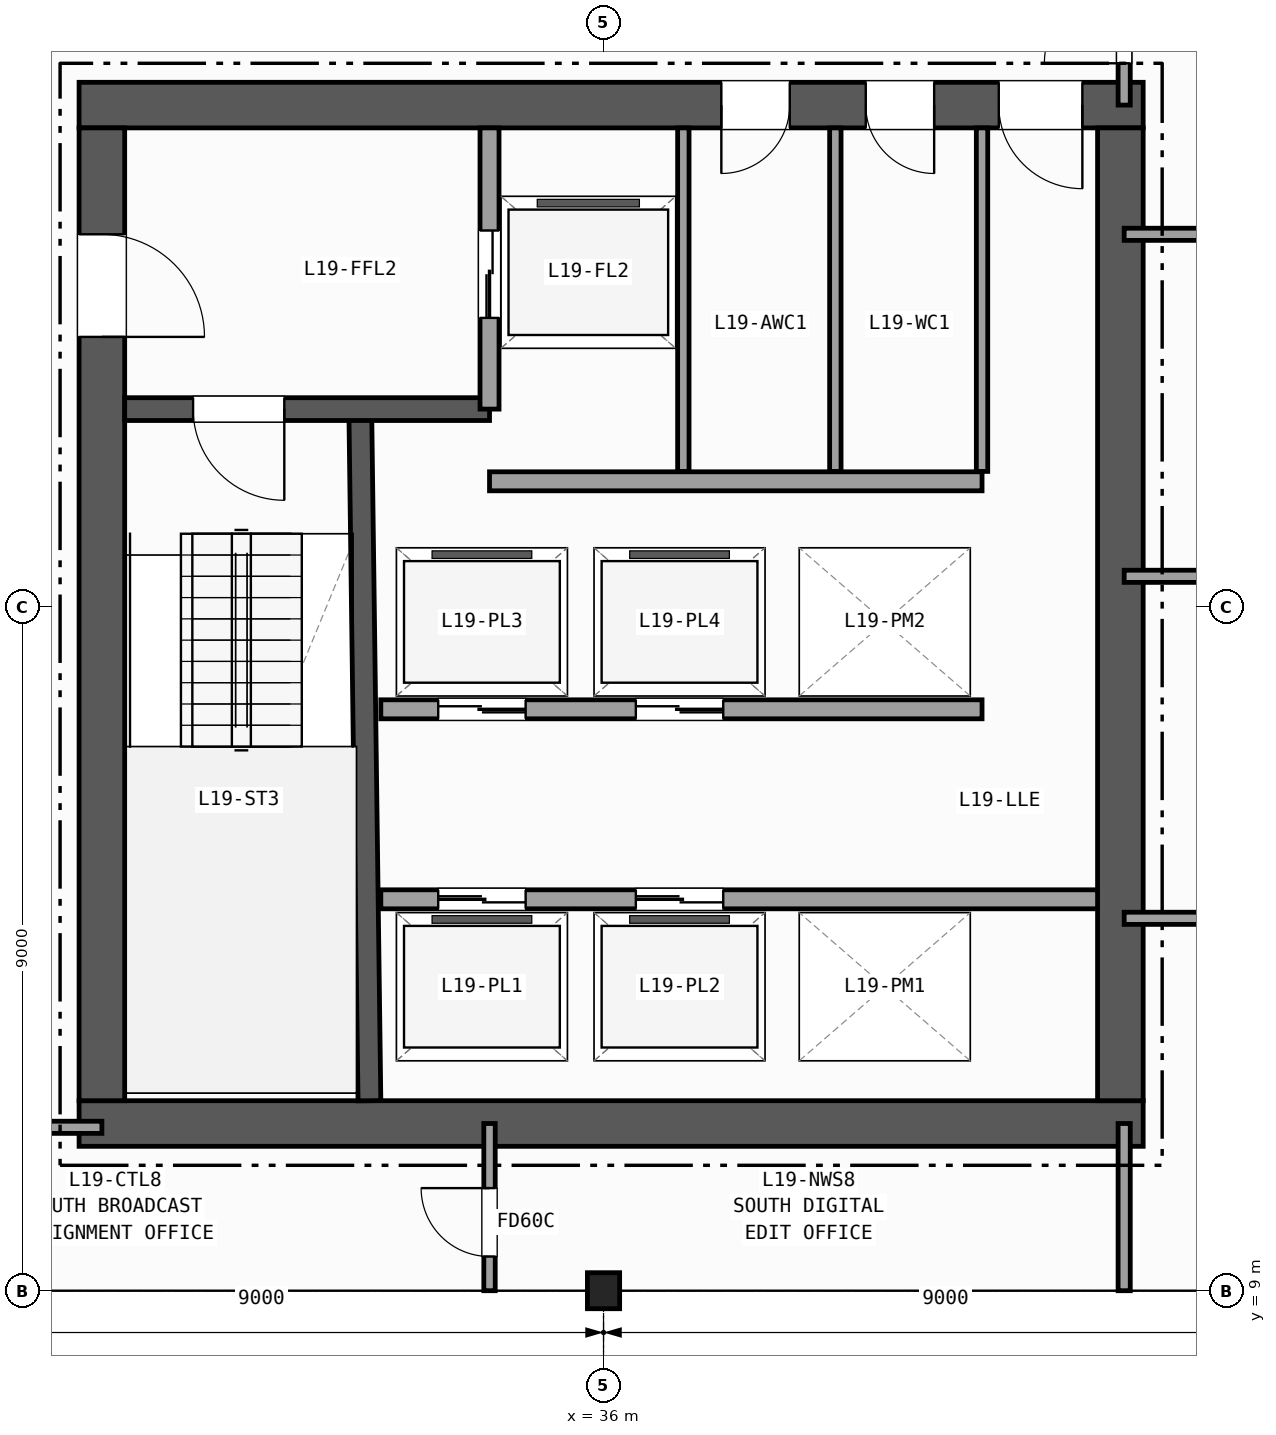
"""IFC4 building model, lengths in metres.
Left out: names, types, materials, properties, quantities, classifications, styles, units other than length and angle.
Written with IfcOpenShell. Run it as: python <this file> out.ifc"""

import sys

from ifc_helpers import new_model, si_unit, direction, frame, frame_2d, origin, origin_2d, place, context, subcontext, project, spatial, rectangle, i_section, extrude, element, fill, save


model = new_model("IFC4")
c1 = context("Model", 3, precision=1e-05, world=origin(), true_north=direction((0.0, 1.0)))
c2 = subcontext(c1, "Body", "Model", "MODEL_VIEW")
j1 = project(units=[si_unit("LENGTHUNIT", "METRE"), si_unit("PLANEANGLEUNIT", "RADIAN")], contexts=[c1])
p1 = place(None, origin())
s1 = spatial("IfcSite", under=j1, at=p1, CompositionType="ELEMENT")
p2 = place(p1, origin())
s2 = spatial("IfcBuilding", under=s1, at=p2, CompositionType="ELEMENT")
p3 = place(p2, frame((0.0, 0.0, 80.4)))
s3 = spatial("IfcBuildingStorey", under=s2, at=p3, CompositionType="ELEMENT", Elevation=80.4)
p4 = place(p3, frame((36.0, 9.0, 0.0), z_axis=(0.0, 0.0, 1.0), x_axis=(1.0, 0.0, 0.0)))
e1 = element("IfcColumn", 1, at=p4, inside=s3, PredefinedType="COLUMN", context=c2, shape_type="SweptSolid", body=[
    extrude(i_section(OverallWidth=0.424, OverallDepth=0.474, WebThickness=0.048, FlangeThickness=0.077, FilletRadius=0.015, at=origin_2d()), origin(), (0.0, 0.0, 1.0), 3.7),
])
p5 = place(p3, frame((29.1, 11.2, 0.0), z_axis=(0.0, 0.0, 1.0), x_axis=(1.0, 0.0, 0.0)))
e2 = element("IfcWall", 2, at=p5, inside=s3, PredefinedType="SHEAR", context=c2, shape_type="SweptSolid", body=[
    extrude(rectangle(XDim=14.0, YDim=0.6, at=frame_2d((7.0, 0.0))), origin(), (0.0, 0.0, 1.0), 3.37),
])
p6 = place(p3, frame((43.1, 24.6, 0.0), z_axis=(0.0, 0.0, 1.0), x_axis=(-1.0, 0.0, 0.0)))
e3 = element("IfcWall", 3, at=p6, inside=s3, PredefinedType="SHEAR", context=c2, shape_type="SweptSolid", body=[
    extrude(rectangle(XDim=14.0, YDim=0.6, at=frame_2d((7.0, 0.0))), origin(), (0.0, 0.0, 1.0), 3.37),
])
p7 = place(p6, frame((0.8, 0.0, 0.0)))
e4 = element("IfcOpeningElement", 4, at=p7, cuts=e3, PredefinedType="OPENING", context=c2, shape_type="SweptSolid", body=[
    extrude(rectangle(XDim=1.1, YDim=2.15, at=frame_2d((0.55, 1.075))), frame((0.0, 0.31, 0.0), z_axis=(0.0, -1.0, 0.0), x_axis=(1.0, 0.0, 0.0)), (0.0, 0.0, 1.0), 0.62),
])
p8 = place(p6, frame((2.75, 0.0, 0.0)))
e5 = element("IfcOpeningElement", 5, at=p8, cuts=e3, PredefinedType="OPENING", context=c2, shape_type="SweptSolid", body=[
    extrude(rectangle(XDim=0.9, YDim=2.1, at=frame_2d((0.45, 1.05))), frame((0.0, 0.31, 0.0), z_axis=(0.0, -1.0, 0.0), x_axis=(1.0, 0.0, 0.0)), (0.0, 0.0, 1.0), 0.62),
])
p9 = place(p6, frame((4.65, 0.0, 0.0)))
e6 = element("IfcOpeningElement", 6, at=p9, cuts=e3, PredefinedType="OPENING", context=c2, shape_type="SweptSolid", body=[
    extrude(rectangle(XDim=0.9, YDim=2.1, at=frame_2d((0.45, 1.05))), frame((0.0, 0.31, 0.0), z_axis=(0.0, -1.0, 0.0), x_axis=(1.0, 0.0, 0.0)), (0.0, 0.0, 1.0), 0.62),
])
p10 = place(p3, frame((29.4, 24.3, 0.0), z_axis=(0.0, 0.0, 1.0), x_axis=(0.0, -1.0, 0.0)))
e7 = element("IfcWall", 7, at=p10, inside=s3, PredefinedType="SHEAR", context=c2, shape_type="SweptSolid", body=[
    extrude(rectangle(XDim=12.8, YDim=0.6, at=frame_2d((6.4, 0.0))), origin(), (0.0, 0.0, 1.0), 3.37),
])
p11 = place(p10, frame((1.4, 0.0, 0.0)))
e8 = element("IfcOpeningElement", 8, at=p11, cuts=e7, PredefinedType="OPENING", context=c2, shape_type="SweptSolid", body=[
    extrude(rectangle(XDim=1.35, YDim=2.15, at=frame_2d((0.675, 1.075))), frame((0.0, 0.31, 0.0), z_axis=(0.0, -1.0, 0.0), x_axis=(1.0, 0.0, 0.0)), (0.0, 0.0, 1.0), 0.62),
])
p12 = place(p3, frame((42.8, 11.5, 0.0), z_axis=(0.0, 0.0, 1.0), x_axis=(0.0, 1.0, 0.0)))
e9 = element("IfcWall", 9, at=p12, inside=s3, PredefinedType="SHEAR", context=c2, shape_type="SweptSolid", body=[
    extrude(rectangle(XDim=12.8, YDim=0.6, at=frame_2d((6.4, 0.0))), origin(), (0.0, 0.0, 1.0), 3.37),
])
p13 = place(p3, frame((32.92, 11.5, 0.0), z_axis=(0.0, 0.0, 1.0), x_axis=(-0.013244407292, 0.999912288991, 0.0)))
e10 = element("IfcWall", 10, at=p13, inside=s3, PredefinedType="SHEAR", context=c2, shape_type="SweptSolid", body=[
    extrude(rectangle(XDim=9.051, YDim=0.3, at=frame_2d((4.525, 0.0))), origin(), (0.0, 0.0, 1.0), 3.37),
])
p14 = place(p3, frame((34.5, 20.6, 0.0), z_axis=(0.0, 0.0, 1.0), x_axis=(-1.0, 0.0, 0.0)))
e11 = element("IfcWall", 11, at=p14, inside=s3, PredefinedType="SHEAR", context=c2, shape_type="SweptSolid", body=[
    extrude(rectangle(XDim=4.8, YDim=0.3, at=frame_2d((2.4, 0.0))), origin(), (0.0, 0.0, 1.0), 3.37),
])
p15 = place(p14, frame((2.7, 0.0, 0.0)))
e12 = element("IfcOpeningElement", 12, at=p15, cuts=e11, PredefinedType="OPENING", context=c2, shape_type="SweptSolid", body=[
    extrude(rectangle(XDim=1.2, YDim=2.15, at=frame_2d((0.6, 1.075))), frame((0.0, 0.16, 0.0), z_axis=(0.0, -1.0, 0.0), x_axis=(1.0, 0.0, 0.0)), (0.0, 0.0, 1.0), 0.32),
])
p16 = place(p3, frame((34.5, 20.6, 0.0), z_axis=(0.0, 0.0, 1.0), x_axis=(0.0, 1.0, 0.0)))
e13 = element("IfcWall", 13, at=p16, inside=s3, PredefinedType="PARTITIONING", context=c2, shape_type="SweptSolid", body=[
    extrude(rectangle(XDim=3.7, YDim=0.25, at=frame_2d((1.85, 0.0))), origin(), (0.0, 0.0, 1.0), 3.37),
])
p17 = place(p16, frame((1.2, 0.0, 0.0)))
e14 = element("IfcOpeningElement", 14, at=p17, cuts=e13, PredefinedType="OPENING", context=c2, shape_type="SweptSolid", body=[
    extrude(rectangle(XDim=1.15, YDim=2.15, at=frame_2d((0.575, 1.075))), frame((0.0, 0.135, 0.0), z_axis=(0.0, -1.0, 0.0), x_axis=(1.0, 0.0, 0.0)), (0.0, 0.0, 1.0), 0.27),
])
p18 = place(p3, frame((34.5, 19.65, 0.0), z_axis=(0.0, 0.0, 1.0), x_axis=(1.0, 0.0, 0.0)))
e15 = element("IfcWall", 15, at=p18, inside=s3, PredefinedType="PARTITIONING", context=c2, shape_type="SweptSolid", body=[
    extrude(rectangle(XDim=6.48, YDim=0.25, at=frame_2d((3.24, 0.0))), origin(), (0.0, 0.0, 1.0), 3.37),
])
p19 = place(p3, frame((33.07, 14.15, 0.0), z_axis=(0.0, 0.0, 1.0), x_axis=(1.0, 0.0, 0.0)))
e16 = element("IfcWall", 16, at=p19, inside=s3, PredefinedType="PARTITIONING", context=c2, shape_type="SweptSolid", body=[
    extrude(rectangle(XDim=9.43, YDim=0.25, at=frame_2d((4.715, 0.0))), origin(), (0.0, 0.0, 1.0), 3.37),
])
p20 = place(p19, frame((0.755, 0.0, 0.0)))
e17 = element("IfcOpeningElement", 17, at=p20, cuts=e16, PredefinedType="OPENING", context=c2, shape_type="SweptSolid", body=[
    extrude(rectangle(XDim=1.15, YDim=2.15, at=frame_2d((0.575, 1.075))), frame((0.0, 0.135, 0.0), z_axis=(0.0, -1.0, 0.0), x_axis=(1.0, 0.0, 0.0)), (0.0, 0.0, 1.0), 0.27),
])
p21 = place(p19, frame((3.355, 0.0, 0.0)))
e18 = element("IfcOpeningElement", 18, at=p21, cuts=e16, PredefinedType="OPENING", context=c2, shape_type="SweptSolid", body=[
    extrude(rectangle(XDim=1.15, YDim=2.15, at=frame_2d((0.575, 1.075))), frame((0.0, 0.135, 0.0), z_axis=(0.0, -1.0, 0.0), x_axis=(1.0, 0.0, 0.0)), (0.0, 0.0, 1.0), 0.27),
])
p22 = place(p3, frame((40.98, 16.65, 0.0), z_axis=(0.0, 0.0, 1.0), x_axis=(-1.0, 0.0, 0.0)))
e19 = element("IfcWall", 19, at=p22, inside=s3, PredefinedType="PARTITIONING", context=c2, shape_type="SweptSolid", body=[
    extrude(rectangle(XDim=7.91, YDim=0.25, at=frame_2d((3.955, 0.0))), origin(), (0.0, 0.0, 1.0), 3.37),
])
p23 = place(p22, frame((6.005, 0.0, 0.0)))
e20 = element("IfcOpeningElement", 20, at=p23, cuts=e19, PredefinedType="OPENING", context=c2, shape_type="SweptSolid", body=[
    extrude(rectangle(XDim=1.15, YDim=2.15, at=frame_2d((0.575, 1.075))), frame((0.0, 0.135, 0.0), z_axis=(0.0, -1.0, 0.0), x_axis=(1.0, 0.0, 0.0)), (0.0, 0.0, 1.0), 0.27),
])
p24 = place(p22, frame((3.405, 0.0, 0.0)))
e21 = element("IfcOpeningElement", 21, at=p24, cuts=e19, PredefinedType="OPENING", context=c2, shape_type="SweptSolid", body=[
    extrude(rectangle(XDim=1.15, YDim=2.15, at=frame_2d((0.575, 1.075))), frame((0.0, 0.135, 0.0), z_axis=(0.0, -1.0, 0.0), x_axis=(1.0, 0.0, 0.0)), (0.0, 0.0, 1.0), 0.27),
])
for number, where, z_axis, x_axis in (
    (22, (37.05, 19.78, 0.0), (0.0, 0.0, 1.0), (0.0, 1.0, 0.0)),
    (23, (39.05, 19.78, 0.0), (0.0, 0.0, 1.0), (0.0, 1.0, 0.0)),
    (24, (40.98, 19.78, 0.0), (0.0, 0.0, 1.0), (0.0, 1.0, 0.0)),
):
    element("IfcWall", number, at=place(p3, frame(where, z_axis=z_axis, x_axis=x_axis)), inside=s3, PredefinedType="PARTITIONING", context=c2, shape_type="SweptSolid", body=[
        extrude(rectangle(XDim=4.52, YDim=0.15, at=frame_2d((2.26, 0.0))), origin(), (0.0, 0.0, 1.0), 3.37),
    ])
p25 = place(p3, frame((24.65, 11.15, 0.0), z_axis=(0.0, 0.0, 1.0), x_axis=(1.0, 0.0, 0.0)))
e25 = element("IfcWall", 25, at=p25, inside=s3, PredefinedType="PARTITIONING", context=c2, shape_type="SweptSolid", body=[
    extrude(rectangle(XDim=4.75, YDim=0.16, at=frame_2d((2.375, 0.0))), origin(), (0.0, 0.0, 1.0), 2.742),
])
p26 = place(p25, frame((1.2, 0.0, 0.0)))
e26 = element("IfcOpeningElement", 26, at=p26, cuts=e25, PredefinedType="OPENING", context=c2, shape_type="SweptSolid", body=[
    extrude(rectangle(XDim=0.95, YDim=2.1, at=frame_2d((0.475, 1.05))), frame((0.0, 0.09, 0.0), z_axis=(0.0, -1.0, 0.0), x_axis=(1.0, 0.0, 0.0)), (0.0, 0.0, 1.0), 0.18),
])
p27 = place(p3, frame((34.5, 9.0, 0.0), z_axis=(0.0, 0.0, 1.0), x_axis=(0.0, 1.0, 0.0)))
e27 = element("IfcWall", 27, at=p27, inside=s3, PredefinedType="PARTITIONING", context=c2, shape_type="SweptSolid", body=[
    extrude(rectangle(XDim=2.2, YDim=0.15, at=frame_2d((1.1, 0.0))), origin(), (0.0, 0.0, 1.0), 2.577),
])
p28 = place(p27, frame((0.45, 0.0, 0.0)))
e28 = element("IfcOpeningElement", 28, at=p28, cuts=e27, PredefinedType="OPENING", context=c2, shape_type="SweptSolid", body=[
    extrude(rectangle(XDim=0.9, YDim=2.1, at=frame_2d((0.45, 1.05))), frame((0.0, 0.085, 0.0), z_axis=(0.0, -1.0, 0.0), x_axis=(1.0, 0.0, 0.0)), (0.0, 0.0, 1.0), 0.17),
])
p29 = place(p3, frame((42.85, 9.0, 0.0), z_axis=(0.0, 0.0, 1.0), x_axis=(0.0, 1.0, 0.0)))
e29 = element("IfcWall", 29, at=p29, inside=s3, PredefinedType="PARTITIONING", context=c2, shape_type="SweptSolid", body=[
    extrude(rectangle(XDim=2.2, YDim=0.16, at=frame_2d((1.1, 0.0))), origin(), (0.0, 0.0, 1.0), 2.577),
])
p30 = place(p3, frame((42.85, 24.6, 0.0), z_axis=(0.0, 0.0, 1.0), x_axis=(0.0, 1.0, 0.0)))
e30 = element("IfcWall", 30, at=p30, inside=s3, PredefinedType="PARTITIONING", context=c2, shape_type="SweptSolid", body=[
    extrude(rectangle(XDim=2.4, YDim=0.16, at=frame_2d((1.2, 0.0))), origin(), (0.0, 0.0, 1.0), 2.577),
])
p31 = place(p30, frame((0.55, 0.0, 0.0)))
e31 = element("IfcOpeningElement", 31, at=p31, cuts=e30, PredefinedType="OPENING", context=c2, shape_type="SweptSolid", body=[
    extrude(rectangle(XDim=1.05, YDim=2.15, at=frame_2d((0.525, 1.075))), frame((0.0, 0.09, 0.0), z_axis=(0.0, -1.0, 0.0), x_axis=(1.0, 0.0, 0.0)), (0.0, 0.0, 1.0), 0.18),
])
p32 = place(p3, frame((42.85, 13.9, 0.0), z_axis=(0.0, 0.0, 1.0), x_axis=(1.0, 0.0, 0.0)))
e32 = element("IfcWall", 32, at=p32, inside=s3, PredefinedType="PARTITIONING", context=c2, shape_type="SweptSolid", body=[
    extrude(rectangle(XDim=20.428, YDim=0.16, at=frame_2d((10.214, 0.0))), origin(), (0.0, 0.0, 1.0), 2.742),
])
p33 = place(p32, frame((4.6, 0.0, 0.0)))
e33 = element("IfcOpeningElement", 33, at=p33, cuts=e32, PredefinedType="OPENING", context=c2, shape_type="SweptSolid", body=[
    extrude(rectangle(XDim=1.2, YDim=2.15, at=frame_2d((0.6, 1.075))), frame((0.0, 0.09, 0.0), z_axis=(0.0, -1.0, 0.0), x_axis=(1.0, 0.0, 0.0)), (0.0, 0.0, 1.0), 0.18),
])
p34 = place(p3, frame((42.85, 18.4, 0.0), z_axis=(0.0, 0.0, 1.0), x_axis=(1.0, 0.0, 0.0)))
e34 = element("IfcWall", 34, at=p34, inside=s3, PredefinedType="PARTITIONING", context=c2, shape_type="SweptSolid", body=[
    extrude(rectangle(XDim=20.809, YDim=0.16, at=frame_2d((10.404, 0.0))), origin(), (0.0, 0.0, 1.0), 2.739),
])
p35 = place(p34, frame((4.6, 0.0, 0.0)))
e35 = element("IfcOpeningElement", 35, at=p35, cuts=e34, PredefinedType="OPENING", context=c2, shape_type="SweptSolid", body=[
    extrude(rectangle(XDim=0.86, YDim=2.05, at=frame_2d((0.43, 1.025))), frame((0.0, 0.09, 0.0), z_axis=(0.0, -1.0, 0.0), x_axis=(1.0, 0.0, 0.0)), (0.0, 0.0, 1.0), 0.18),
])
p36 = place(p3, frame((42.85, 22.9, 0.0), z_axis=(0.0, 0.0, 1.0), x_axis=(1.0, 0.0, 0.0)))
e36 = element("IfcWall", 36, at=p36, inside=s3, PredefinedType="PARTITIONING", context=c2, shape_type="SweptSolid", body=[
    extrude(rectangle(XDim=20.346, YDim=0.16, at=frame_2d((10.173, 0.0))), origin(), (0.0, 0.0, 1.0), 2.739),
])
p37 = place(p36, frame((4.6, 0.0, 0.0)))
e37 = element("IfcOpeningElement", 37, at=p37, cuts=e36, PredefinedType="OPENING", context=c2, shape_type="SweptSolid", body=[
    extrude(rectangle(XDim=0.95, YDim=2.1, at=frame_2d((0.475, 1.05))), frame((0.0, 0.09, 0.0), z_axis=(0.0, -1.0, 0.0), x_axis=(1.0, 0.0, 0.0)), (0.0, 0.0, 1.0), 0.18),
])
p38 = place(p15, origin())
e38 = element("IfcDoor", 38, at=p38, inside=s3, OperationType="SINGLE_SWING_LEFT", PredefinedType="DOOR", context=c2, shape_type="SweptSolid", body=[
    extrude(rectangle(XDim=1.2, YDim=2.15, at=frame_2d((0.6, 1.075))), frame((0.0, 0.025, 0.0), z_axis=(0.0, -1.0, 0.0), x_axis=(1.0, 0.0, 0.0)), (0.0, 0.0, 1.0), 0.05),
])
fill(e12, e38)
p39 = place(p11, origin())
e39 = element("IfcDoor", 39, at=p39, inside=s3, OperationType="SINGLE_SWING_RIGHT", PredefinedType="DOOR", context=c2, shape_type="SweptSolid", body=[
    extrude(rectangle(XDim=1.35, YDim=2.15, at=frame_2d((0.675, 1.075))), frame((0.0, 0.025, 0.0), z_axis=(0.0, -1.0, 0.0), x_axis=(1.0, 0.0, 0.0)), (0.0, 0.0, 1.0), 0.05),
])
fill(e8, e39)
p40 = place(p7, origin())
e40 = element("IfcDoor", 40, at=p40, inside=s3, OperationType="SINGLE_SWING_LEFT", PredefinedType="DOOR", context=c2, shape_type="SweptSolid", body=[
    extrude(rectangle(XDim=1.1, YDim=2.15, at=frame_2d((0.55, 1.075))), frame((0.0, 0.025, 0.0), z_axis=(0.0, -1.0, 0.0), x_axis=(1.0, 0.0, 0.0)), (0.0, 0.0, 1.0), 0.05),
])
fill(e4, e40)
p41 = place(p8, origin())
e41 = element("IfcDoor", 41, at=p41, inside=s3, OperationType="SINGLE_SWING_LEFT", PredefinedType="DOOR", context=c2, shape_type="SweptSolid", body=[
    extrude(rectangle(XDim=0.9, YDim=2.1, at=frame_2d((0.45, 1.05))), frame((0.0, 0.025, 0.0), z_axis=(0.0, -1.0, 0.0), x_axis=(1.0, 0.0, 0.0)), (0.0, 0.0, 1.0), 0.05),
])
fill(e5, e41)
p42 = place(p9, origin())
e42 = element("IfcDoor", 42, at=p42, inside=s3, OperationType="SINGLE_SWING_RIGHT", PredefinedType="DOOR", context=c2, shape_type="SweptSolid", body=[
    extrude(rectangle(XDim=0.9, YDim=2.1, at=frame_2d((0.45, 1.05))), frame((0.0, 0.025, 0.0), z_axis=(0.0, -1.0, 0.0), x_axis=(1.0, 0.0, 0.0)), (0.0, 0.0, 1.0), 0.05),
])
fill(e6, e42)
p43 = place(p17, origin())
e43 = element("IfcDoor", 43, at=p43, inside=s3, OperationType="DOUBLE_DOOR_SLIDING", PredefinedType="DOOR", context=c2, shape_type="SweptSolid", body=[
    extrude(rectangle(XDim=1.15, YDim=2.15, at=frame_2d((0.575, 1.075))), frame((0.0, 0.025, 0.0), z_axis=(0.0, -1.0, 0.0), x_axis=(1.0, 0.0, 0.0)), (0.0, 0.0, 1.0), 0.05),
])
fill(e14, e43)
p44 = place(p20, origin())
e44 = element("IfcDoor", 44, at=p44, inside=s3, OperationType="DOUBLE_DOOR_SLIDING", PredefinedType="DOOR", context=c2, shape_type="SweptSolid", body=[
    extrude(rectangle(XDim=1.15, YDim=2.15, at=frame_2d((0.575, 1.075))), frame((0.0, 0.025, 0.0), z_axis=(0.0, -1.0, 0.0), x_axis=(1.0, 0.0, 0.0)), (0.0, 0.0, 1.0), 0.05),
])
fill(e17, e44)
p45 = place(p21, origin())
e45 = element("IfcDoor", 45, at=p45, inside=s3, OperationType="DOUBLE_DOOR_SLIDING", PredefinedType="DOOR", context=c2, shape_type="SweptSolid", body=[
    extrude(rectangle(XDim=1.15, YDim=2.15, at=frame_2d((0.575, 1.075))), frame((0.0, 0.025, 0.0), z_axis=(0.0, -1.0, 0.0), x_axis=(1.0, 0.0, 0.0)), (0.0, 0.0, 1.0), 0.05),
])
fill(e18, e45)
p46 = place(p23, origin())
e46 = element("IfcDoor", 46, at=p46, inside=s3, OperationType="DOUBLE_DOOR_SLIDING", PredefinedType="DOOR", context=c2, shape_type="SweptSolid", body=[
    extrude(rectangle(XDim=1.15, YDim=2.15, at=frame_2d((0.575, 1.075))), frame((0.0, 0.025, 0.0), z_axis=(0.0, -1.0, 0.0), x_axis=(1.0, 0.0, 0.0)), (0.0, 0.0, 1.0), 0.05),
])
fill(e20, e46)
p47 = place(p24, origin())
e47 = element("IfcDoor", 47, at=p47, inside=s3, OperationType="DOUBLE_DOOR_SLIDING", PredefinedType="DOOR", context=c2, shape_type="SweptSolid", body=[
    extrude(rectangle(XDim=1.15, YDim=2.15, at=frame_2d((0.575, 1.075))), frame((0.0, 0.025, 0.0), z_axis=(0.0, -1.0, 0.0), x_axis=(1.0, 0.0, 0.0)), (0.0, 0.0, 1.0), 0.05),
])
fill(e21, e47)
p48 = place(p28, origin())
e48 = element("IfcDoor", 48, at=p48, inside=s3, OperationType="SINGLE_SWING_RIGHT", PredefinedType="DOOR", context=c2, shape_type="SweptSolid", body=[
    extrude(rectangle(XDim=0.9, YDim=2.1, at=frame_2d((0.45, 1.05))), frame((0.0, 0.025, 0.0), z_axis=(0.0, -1.0, 0.0), x_axis=(1.0, 0.0, 0.0)), (0.0, 0.0, 1.0), 0.05),
])
fill(e28, e48)
p49 = place(p31, origin())
e49 = element("IfcDoor", 49, at=p49, inside=s3, OperationType="SINGLE_SWING_LEFT", PredefinedType="DOOR", context=c2, shape_type="SweptSolid", body=[
    extrude(rectangle(XDim=1.05, YDim=2.15, at=frame_2d((0.525, 1.075))), frame((0.0, 0.025, 0.0), z_axis=(0.0, -1.0, 0.0), x_axis=(1.0, 0.0, 0.0)), (0.0, 0.0, 1.0), 0.05),
])
fill(e31, e49)
save(model, sys.argv[1])
